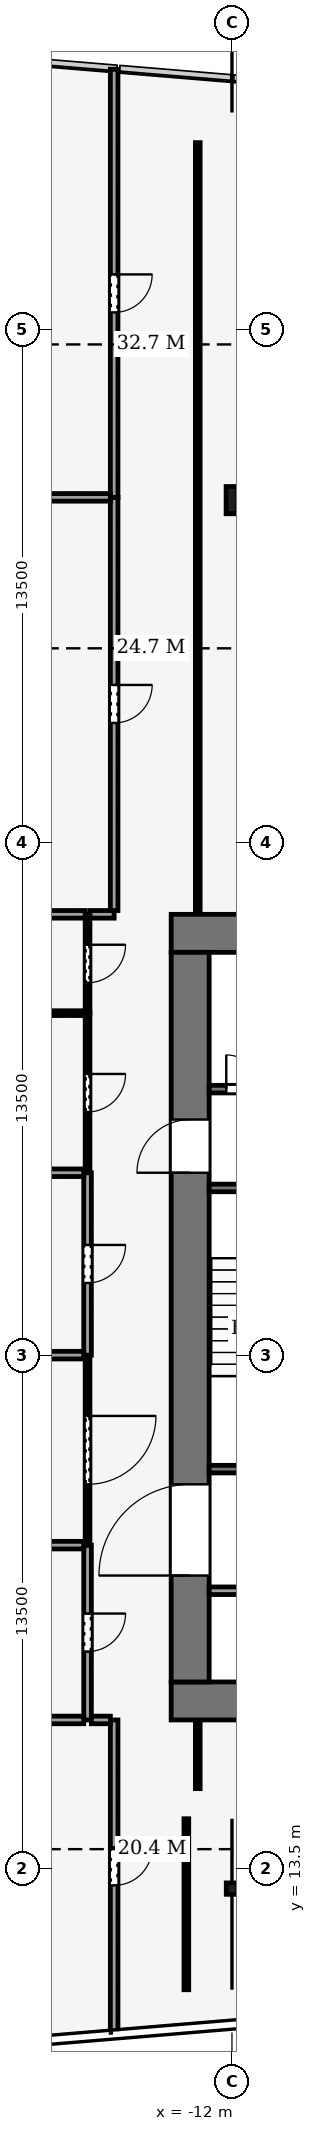
"""IFC4 building model, lengths in metres.
Left out: names, types, materials, properties, quantities, classifications, styles, units other than length and angle.
Written with IfcOpenShell. Run it as: python <this file> out.ifc"""

import sys

from ifc_helpers import new_model, si_unit, direction, frame, frame_2d, origin, origin_2d, place, context, subcontext, project, spatial, rectangle, hollow_rectangle, i_section, extrude, element, fill, save


model = new_model("IFC4")
c1 = context("Model", 3, precision=1e-05, world=origin(), true_north=direction((0.0, 1.0)))
c2 = subcontext(c1, "Body", "Model", "MODEL_VIEW")
j1 = project(units=[si_unit("LENGTHUNIT", "METRE"), si_unit("PLANEANGLEUNIT", "RADIAN")], contexts=[c1])
p1 = place(None, origin())
s1 = spatial("IfcSite", under=j1, at=p1, CompositionType="ELEMENT")
p2 = place(p1, origin())
s2 = spatial("IfcBuilding", under=s1, at=p2, CompositionType="ELEMENT")
p3 = place(p2, frame((0.0, 0.0, 170.0)))
s3 = spatial("IfcBuildingStorey", under=s2, at=p3, CompositionType="ELEMENT", Elevation=170.0)
for number, where, z_axis, x_axis in (
    (1, (-13.6, 17.9, -0.25), (0.0, 0.0, 1.0), (1.0, 0.0, 0.0)),
    (2, (-13.6, 38.1, -0.25), (0.0, 0.0, 1.0), (1.0, 0.0, 0.0)),
):
    element("IfcWall", number, at=place(p3, frame(where, z_axis=z_axis, x_axis=x_axis)), inside=s3, PredefinedType="SHEAR", context=c2, shape_type="SweptSolid", body=[
        extrude(rectangle(XDim=27.2, YDim=1.0, at=frame_2d((13.6, 0.0))), origin(), (0.0, 0.0, 1.0), 7.12),
    ])
p4 = place(p3, frame((-13.1, 18.4, -0.25), z_axis=(0.0, 0.0, 1.0), x_axis=(0.0, 1.0, 0.0)))
e3 = element("IfcWall", 3, at=p4, inside=s3, PredefinedType="SHEAR", context=c2, shape_type="SweptSolid", body=[
    extrude(rectangle(XDim=19.2, YDim=1.0, at=frame_2d((9.6, 0.0))), origin(), (0.0, 0.0, 1.0), 7.12),
])
p5 = place(p4, frame((2.8, 0.0, 0.25)))
e4 = element("IfcOpeningElement", 4, at=p5, cuts=e3, PredefinedType="OPENING", context=c2, shape_type="SweptSolid", body=[
    extrude(rectangle(XDim=2.4, YDim=2.4, at=frame_2d((1.2, 1.2))), frame((0.0, 0.51, 0.0), z_axis=(0.0, -1.0, 0.0), x_axis=(1.0, 0.0, 0.0)), (0.0, 0.0, 1.0), 1.02),
])
p6 = place(p4, frame((13.4, 0.0, 0.25)))
e5 = element("IfcOpeningElement", 5, at=p6, cuts=e3, PredefinedType="OPENING", context=c2, shape_type="SweptSolid", body=[
    extrude(rectangle(XDim=1.4, YDim=2.2, at=frame_2d((0.7, 1.1))), frame((0.0, 0.51, 0.0), z_axis=(0.0, -1.0, 0.0), x_axis=(1.0, 0.0, 0.0)), (0.0, 0.0, 1.0), 1.02),
])
p7 = place(p3, frame((-12.0, 59.7, 0.297), z_axis=(0.0, 0.780548002153, 0.625095845719), x_axis=(-1.0, 0.0, 0.0)))
e6 = element("IfcColumn", 6, at=p7, inside=s3, PredefinedType="COLUMN", context=c2, shape_type="SweptSolid", body=[
    extrude(hollow_rectangle(XDim=0.7, YDim=0.7, WallThickness=0.03, at=origin_2d()), origin(), (0.0, 0.0, 1.0), 10.249),
])
p8 = place(p3, frame((-12.0, 10.3, 0.226), z_axis=(0.0, 0.566330599135, 0.824178167925), x_axis=(-1.0, 0.0, 0.0)))
e7 = element("IfcColumn", 7, at=p8, inside=s3, PredefinedType="COLUMN", context=c2, shape_type="SweptSolid", body=[
    extrude(hollow_rectangle(XDim=0.7, YDim=0.7, WallThickness=0.03, at=origin_2d()), origin(), (0.0, 0.0, 1.0), 7.946),
])
p9 = place(p3, frame((-12.0, 49.5, 0.0), z_axis=(0.0, 0.0, 1.0), x_axis=(1.0, 0.0, 0.0)))
e8 = element("IfcColumn", 8, at=p9, inside=s3, PredefinedType="COLUMN", context=c2, shape_type="SweptSolid", body=[
    extrude(i_section(OverallWidth=0.308, OverallDepth=0.716, WebThickness=0.021, FlangeThickness=0.04, FilletRadius=0.027, at=origin_2d()), origin(), (0.0, 0.0, 1.0), 7.0),
])
p10 = place(p3, frame((-12.0, 12.961, 4.935), z_axis=(0.0, 0.0, 1.0), x_axis=(1.0, 0.0, 0.0)))
e9 = element("IfcColumn", 9, at=p10, inside=s3, PredefinedType="COLUMN", context=c2, shape_type="SweptSolid", body=[
    extrude(i_section(OverallWidth=0.3, OverallDepth=0.3, WebThickness=0.011, FlangeThickness=0.019, FilletRadius=0.027, at=origin_2d()), origin(), (0.0, 0.0, 1.0), 1.765),
])
p11 = place(p3, frame((-12.6, 20.8, 0.0), z_axis=(0.0, 0.0, 1.0), x_axis=(1.0, 0.0, 0.0)))
e10 = element("IfcWall", 10, at=p11, inside=s3, PredefinedType="PARTITIONING", context=c2, shape_type="SweptSolid", body=[
    extrude(rectangle(XDim=6.6, YDim=0.2, at=frame_2d((3.3, 0.0))), origin(), (0.0, 0.0, 1.0), 6.87),
])
p12 = place(p11, frame((2.8, 0.0, 0.0)))
e11 = element("IfcOpeningElement", 11, at=p12, cuts=e10, PredefinedType="OPENING", context=c2, shape_type="SweptSolid", body=[
    extrude(rectangle(XDim=1.0, YDim=2.1, at=frame_2d((0.5, 1.05))), frame((0.0, 0.11, 0.0), z_axis=(0.0, -1.0, 0.0), x_axis=(1.0, 0.0, 0.0)), (0.0, 0.0, 1.0), 0.22),
])
p13 = place(p3, frame((-12.6, 24.0, 0.0), z_axis=(0.0, 0.0, 1.0), x_axis=(1.0, 0.0, 0.0)))
e12 = element("IfcWall", 12, at=p13, inside=s3, PredefinedType="PARTITIONING", context=c2, shape_type="SweptSolid", body=[
    extrude(rectangle(XDim=6.6, YDim=0.2, at=frame_2d((3.3, 0.0))), origin(), (0.0, 0.0, 1.0), 6.87),
])
p14 = place(p13, frame((4.7, 0.0, 0.0)))
e13 = element("IfcOpeningElement", 13, at=p14, cuts=e12, PredefinedType="OPENING", context=c2, shape_type="SweptSolid", body=[
    extrude(rectangle(XDim=1.0, YDim=2.1, at=frame_2d((0.5, 1.05))), frame((0.0, 0.11, 0.0), z_axis=(0.0, -1.0, 0.0), x_axis=(1.0, 0.0, 0.0)), (0.0, 0.0, 1.0), 0.22),
])
p15 = place(p3, frame((-12.6, 31.4, 0.0), z_axis=(0.0, 0.0, 1.0), x_axis=(1.0, 0.0, 0.0)))
e14 = element("IfcWall", 14, at=p15, inside=s3, PredefinedType="PARTITIONING", context=c2, shape_type="SweptSolid", body=[
    extrude(rectangle(XDim=6.6, YDim=0.2, at=frame_2d((3.3, 0.0))), origin(), (0.0, 0.0, 1.0), 6.87),
])
p16 = place(p15, frame((1.0, 0.0, 0.0)))
e15 = element("IfcOpeningElement", 15, at=p16, cuts=e14, PredefinedType="OPENING", context=c2, shape_type="SweptSolid", body=[
    extrude(rectangle(XDim=1.2, YDim=2.2, at=frame_2d((0.6, 1.1))), frame((0.0, 0.11, 0.0), z_axis=(0.0, -1.0, 0.0), x_axis=(1.0, 0.0, 0.0)), (0.0, 0.0, 1.0), 0.22),
])
p17 = place(p3, frame((-12.6, 34.0, 0.0), z_axis=(0.0, 0.0, 1.0), x_axis=(1.0, 0.0, 0.0)))
e16 = element("IfcWall", 16, at=p17, inside=s3, PredefinedType="PARTITIONING", context=c2, shape_type="SweptSolid", body=[
    extrude(rectangle(XDim=6.6, YDim=0.2, at=frame_2d((3.3, 0.0))), origin(), (0.0, 0.0, 1.0), 6.87),
])
p18 = place(p17, frame((4.7, 0.0, 0.0)))
e17 = element("IfcOpeningElement", 17, at=p18, cuts=e16, PredefinedType="OPENING", context=c2, shape_type="SweptSolid", body=[
    extrude(rectangle(XDim=1.4, YDim=2.2, at=frame_2d((0.7, 1.1))), frame((0.0, 0.11, 0.0), z_axis=(0.0, -1.0, 0.0), x_axis=(1.0, 0.0, 0.0)), (0.0, 0.0, 1.0), 0.22),
])
p19 = place(p17, frame((2.3, 0.0, 0.0)))
e18 = element("IfcOpeningElement", 18, at=p19, cuts=e16, PredefinedType="OPENING", context=c2, shape_type="SweptSolid", body=[
    extrude(rectangle(XDim=1.4, YDim=2.2, at=frame_2d((0.7, 1.1))), frame((0.0, 0.11, 0.0), z_axis=(0.0, -1.0, 0.0), x_axis=(1.0, 0.0, 0.0)), (0.0, 0.0, 1.0), 0.22),
])
p20 = place(p17, frame((0.45, 0.0, 0.0)))
e19 = element("IfcOpeningElement", 19, at=p20, cuts=e16, PredefinedType="OPENING", context=c2, shape_type="SweptSolid", body=[
    extrude(rectangle(XDim=0.9, YDim=2.1, at=frame_2d((0.45, 1.05))), frame((0.0, 0.11, 0.0), z_axis=(0.0, -1.0, 0.0), x_axis=(1.0, 0.0, 0.0)), (0.0, 0.0, 1.0), 0.22),
])
p21 = place(p3, frame((-15.8, 22.0, 0.0), z_axis=(0.0, 0.0, 1.0), x_axis=(0.0, -1.0, 0.0)))
e20 = element("IfcWall", 20, at=p21, inside=s3, PredefinedType="PARTITIONING", context=c2, shape_type="SweptSolid", body=[
    extrude(rectangle(XDim=4.6, YDim=0.2, at=frame_2d((2.3, 0.0))), origin(), (0.0, 0.0, 1.0), 6.14),
])
p22 = place(p21, frame((1.8, 0.0, 0.0)))
e21 = element("IfcOpeningElement", 21, at=p22, cuts=e20, PredefinedType="OPENING", context=c2, shape_type="SweptSolid", body=[
    extrude(rectangle(XDim=1.0, YDim=2.1, at=frame_2d((0.5, 1.05))), frame((0.0, 0.11, 0.0), z_axis=(0.0, -1.0, 0.0), x_axis=(1.0, 0.0, 0.0)), (0.0, 0.0, 1.0), 0.22),
])
p23 = place(p3, frame((-15.8, 27.0, 0.0), z_axis=(0.0, 0.0, 1.0), x_axis=(0.0, -1.0, 0.0)))
e22 = element("IfcWall", 22, at=p23, inside=s3, PredefinedType="PARTITIONING", context=c2, shape_type="SweptSolid", body=[
    extrude(rectangle(XDim=5.0, YDim=0.125, at=frame_2d((2.5, 0.0))), origin(), (0.0, 0.0, 1.0), 6.39),
])
p24 = place(p23, frame((1.6, 0.0, 0.0)))
e23 = element("IfcOpeningElement", 23, at=p24, cuts=e22, PredefinedType="OPENING", context=c2, shape_type="SweptSolid", body=[
    extrude(rectangle(XDim=1.8, YDim=2.4, at=frame_2d((0.9, 1.2))), frame((0.0, 0.073, 0.0), z_axis=(0.0, -1.0, 0.0), x_axis=(1.0, 0.0, 0.0)), (0.0, 0.0, 1.0), 0.145),
])
p25 = place(p3, frame((-15.8, 31.8, 0.0), z_axis=(0.0, 0.0, 1.0), x_axis=(0.0, -1.0, 0.0)))
e24 = element("IfcWall", 24, at=p25, inside=s3, PredefinedType="PARTITIONING", context=c2, shape_type="SweptSolid", body=[
    extrude(rectangle(XDim=4.8, YDim=0.2, at=frame_2d((2.4, 0.0))), origin(), (0.0, 0.0, 1.0), 6.44),
])
p26 = place(p25, frame((1.9, 0.0, 0.0)))
e25 = element("IfcOpeningElement", 25, at=p26, cuts=e24, PredefinedType="OPENING", context=c2, shape_type="SweptSolid", body=[
    extrude(rectangle(XDim=1.0, YDim=2.1, at=frame_2d((0.5, 1.05))), frame((0.0, 0.11, 0.0), z_axis=(0.0, -1.0, 0.0), x_axis=(1.0, 0.0, 0.0)), (0.0, 0.0, 1.0), 0.22),
])
p27 = place(p3, frame((-15.8, 36.0, 0.0), z_axis=(0.0, 0.0, 1.0), x_axis=(0.0, -1.0, 0.0)))
e26 = element("IfcWall", 26, at=p27, inside=s3, PredefinedType="PARTITIONING", context=c2, shape_type="SweptSolid", body=[
    extrude(rectangle(XDim=4.2, YDim=0.125, at=frame_2d((2.1, 0.0))), origin(), (0.0, 0.0, 1.0), 6.44),
])
p28 = place(p27, frame((1.6, 0.0, 0.0)))
e27 = element("IfcOpeningElement", 27, at=p28, cuts=e26, PredefinedType="OPENING", context=c2, shape_type="SweptSolid", body=[
    extrude(rectangle(XDim=1.0, YDim=2.1, at=frame_2d((0.5, 1.05))), frame((0.0, 0.073, 0.0), z_axis=(0.0, -1.0, 0.0), x_axis=(1.0, 0.0, 0.0)), (0.0, 0.0, 1.0), 0.145),
])
p29 = place(p3, frame((-15.8, 38.6, 0.0), z_axis=(0.0, 0.0, 1.0), x_axis=(0.0, -1.0, 0.0)))
e28 = element("IfcWall", 28, at=p29, inside=s3, PredefinedType="PARTITIONING", context=c2, shape_type="SweptSolid", body=[
    extrude(rectangle(XDim=2.6, YDim=0.125, at=frame_2d((1.3, 0.0))), origin(), (0.0, 0.0, 1.0), 6.14),
])
p30 = place(p29, frame((0.8, 0.0, 0.0)))
e29 = element("IfcOpeningElement", 29, at=p30, cuts=e28, PredefinedType="OPENING", context=c2, shape_type="SweptSolid", body=[
    extrude(rectangle(XDim=1.0, YDim=2.1, at=frame_2d((0.5, 1.05))), frame((0.0, 0.073, 0.0), z_axis=(0.0, -1.0, 0.0), x_axis=(1.0, 0.0, 0.0)), (0.0, 0.0, 1.0), 0.145),
])
p31 = place(p3, frame((-15.1, 17.4, 0.0), z_axis=(0.0, 0.0, 1.0), x_axis=(0.0, -1.0, 0.0)))
e30 = element("IfcWall", 30, at=p31, inside=s3, PredefinedType="PARTITIONING", context=c2, shape_type="SweptSolid", body=[
    extrude(rectangle(XDim=8.238, YDim=0.2, at=frame_2d((4.119, 0.0))), origin(), (0.0, 0.0, 1.0), 6.04),
])
p32 = place(p31, frame((3.354, 0.0, 0.0)))
e31 = element("IfcOpeningElement", 31, at=p32, cuts=e30, PredefinedType="OPENING", context=c2, shape_type="SweptSolid", body=[
    extrude(rectangle(XDim=1.0, YDim=2.1, at=frame_2d((0.5, 1.05))), frame((0.0, 0.11, 0.0), z_axis=(0.0, -1.0, 0.0), x_axis=(1.0, 0.0, 0.0)), (0.0, 0.0, 1.0), 0.22),
])
p33 = place(p3, frame((-15.2, 17.4, 0.0), z_axis=(0.0, 0.0, 1.0), x_axis=(-1.0, 0.0, 0.0)))
e32 = element("IfcWall", 32, at=p33, inside=s3, PredefinedType="PARTITIONING", context=c2, shape_type="SweptSolid", body=[
    extrude(rectangle(XDim=0.5, YDim=0.2, at=frame_2d((0.25, 0.0))), origin(), (0.0, 0.0, 1.0), 6.14),
])
p34 = place(p3, frame((-15.738, 38.6, 0.0), z_axis=(0.0, 0.0, 1.0), x_axis=(1.0, 0.0, 0.0)))
e33 = element("IfcWall", 33, at=p34, inside=s3, PredefinedType="PARTITIONING", context=c2, shape_type="SweptSolid", body=[
    extrude(rectangle(XDim=0.637, YDim=0.2, at=frame_2d((0.319, 0.0))), origin(), (0.0, 0.0, 1.0), 6.14),
])
p35 = place(p3, frame((-15.1, 49.573, 0.0), z_axis=(0.0, 0.0, 1.0), x_axis=(0.0, -1.0, 0.0)))
e34 = element("IfcWall", 34, at=p35, inside=s3, PredefinedType="PARTITIONING", context=c2, shape_type="SweptSolid", body=[
    extrude(rectangle(XDim=10.873, YDim=0.2, at=frame_2d((5.437, 0.0))), origin(), (0.0, 0.0, 1.0), 6.14),
])
p36 = place(p35, frame((4.937, 0.0, 0.0)))
e35 = element("IfcOpeningElement", 35, at=p36, cuts=e34, PredefinedType="OPENING", context=c2, shape_type="SweptSolid", body=[
    extrude(rectangle(XDim=1.0, YDim=2.1, at=frame_2d((0.5, 1.05))), frame((0.0, 0.11, 0.0), z_axis=(0.0, -1.0, 0.0), x_axis=(1.0, 0.0, 0.0)), (0.0, 0.0, 1.0), 0.22),
])
p37 = place(p3, frame((-15.1, 60.838, 0.0), z_axis=(0.0, 0.0, 1.0), x_axis=(0.0, -1.0, 0.0)))
e36 = element("IfcWall", 36, at=p37, inside=s3, PredefinedType="PARTITIONING", context=c2, shape_type="SweptSolid", body=[
    extrude(rectangle(XDim=11.265, YDim=0.2, at=frame_2d((5.633, 0.0))), origin(), (0.0, 0.0, 1.0), 6.24),
])
p38 = place(p37, frame((5.398, 0.0, 0.0)))
e37 = element("IfcOpeningElement", 37, at=p38, cuts=e36, PredefinedType="OPENING", context=c2, shape_type="SweptSolid", body=[
    extrude(rectangle(XDim=1.0, YDim=2.1, at=frame_2d((0.5, 1.05))), frame((0.0, 0.11, 0.0), z_axis=(0.0, -1.0, 0.0), x_axis=(1.0, 0.0, 0.0)), (0.0, 0.0, 1.0), 0.22),
])
p39 = place(p3, frame((-19.9, 22.0, 0.0), z_axis=(0.0, 0.0, 1.0), x_axis=(1.0, 0.0, 0.0)))
e38 = element("IfcWall", 38, at=p39, inside=s3, PredefinedType="PARTITIONING", context=c2, shape_type="SweptSolid", body=[
    extrude(rectangle(XDim=4.0, YDim=0.2, at=frame_2d((2.0, 0.0))), origin(), (0.0, 0.0, 1.0), 6.87),
])
p40 = place(p3, frame((-15.9, 17.4, 0.0), z_axis=(0.0, 0.0, 1.0), x_axis=(-1.0, 0.0, 0.0)))
e39 = element("IfcWall", 39, at=p40, inside=s3, PredefinedType="PARTITIONING", context=c2, shape_type="SweptSolid", body=[
    extrude(rectangle(XDim=4.0, YDim=0.2, at=frame_2d((2.0, 0.0))), origin(), (0.0, 0.0, 1.0), 6.14),
])
for number, where, z_axis, x_axis in (
    (40, (-19.9, 27.0, 0.0), (0.0, 0.0, 1.0), (1.0, 0.0, 0.0)),
    (41, (-19.9, 31.8, 0.0), (0.0, 0.0, 1.0), (1.0, 0.0, 0.0)),
):
    element("IfcWall", number, at=place(p3, frame(where, z_axis=z_axis, x_axis=x_axis)), inside=s3, PredefinedType="PARTITIONING", context=c2, shape_type="SweptSolid", body=[
        extrude(rectangle(XDim=4.0, YDim=0.2, at=frame_2d((2.0, 0.0))), origin(), (0.0, 0.0, 1.0), 6.87),
    ])
p41 = place(p3, frame((-19.8, 36.0, 0.0), z_axis=(0.0, 0.0, 1.0), x_axis=(1.0, 0.0, 0.0)))
e42 = element("IfcWall", 42, at=p41, inside=s3, PredefinedType="PARTITIONING", context=c2, shape_type="SweptSolid", body=[
    extrude(rectangle(XDim=3.938, YDim=0.125, at=frame_2d((1.969, 0.0))), origin(), (0.0, 0.0, 1.0), 6.87),
])
p42 = place(p3, frame((-19.8, 38.6, 0.0), z_axis=(0.0, 0.0, 1.0), x_axis=(1.0, 0.0, 0.0)))
e43 = element("IfcWall", 43, at=p42, inside=s3, PredefinedType="PARTITIONING", context=c2, shape_type="SweptSolid", body=[
    extrude(rectangle(XDim=3.938, YDim=0.2, at=frame_2d((1.969, 0.0))), origin(), (0.0, 0.0, 1.0), 6.14),
])
p43 = place(p3, frame((-19.9, 49.573, 0.0), z_axis=(0.0, 0.0, 1.0), x_axis=(1.0, 0.0, 0.0)))
e44 = element("IfcWall", 44, at=p43, inside=s3, PredefinedType="PARTITIONING", context=c2, shape_type="SweptSolid", body=[
    extrude(rectangle(XDim=4.7, YDim=0.2, at=frame_2d((2.35, 0.0))), origin(), (0.0, 0.0, 1.0), 6.24),
])
p44 = place(p3, frame((-12.9, 58.908, 0.0), z_axis=(0.0, 0.0, 1.0), x_axis=(0.0, -1.0, 0.0)))
e45 = element("IfcWall", 45, at=p44, inside=s3, PredefinedType="PARTITIONING", context=c2, shape_type="SweptSolid", body=[
    extrude(rectangle(XDim=20.258, YDim=0.125, at=frame_2d((10.129, 0.0))), origin(), (0.0, 0.0, 1.0), 6.24),
])
p45 = place(p3, frame((-12.9, 17.35, 0.0), z_axis=(0.0, 0.0, 1.0), x_axis=(0.0, -1.0, 0.0)))
e46 = element("IfcWall", 46, at=p45, inside=s3, PredefinedType="PARTITIONING", context=c2, shape_type="SweptSolid", body=[
    extrude(rectangle(XDim=1.758, YDim=0.125, at=frame_2d((0.879, 0.0))), origin(), (0.0, 0.0, 1.0), 6.87),
])
p46 = place(p3, frame((-13.2, 14.8, 0.0), z_axis=(0.0, 0.0, 1.0), x_axis=(0.0, -1.0, 0.0)))
e47 = element("IfcWall", 47, at=p46, inside=s3, PredefinedType="PARTITIONING", context=c2, shape_type="SweptSolid", body=[
    extrude(rectangle(XDim=4.5, YDim=0.125, at=frame_2d((2.25, 0.0))), origin(), (0.0, 0.0, 1.0), 6.04),
])
p47 = place(p20, origin())
e48 = element("IfcDoor", 48, at=p47, inside=s3, OperationType="SINGLE_SWING_RIGHT", PredefinedType="DOOR", context=c2, shape_type="SweptSolid", body=[
    extrude(rectangle(XDim=0.9, YDim=2.1, at=frame_2d((0.45, 1.05))), frame((0.0, 0.025, 0.0), z_axis=(0.0, -1.0, 0.0), x_axis=(1.0, 0.0, 0.0)), (0.0, 0.0, 1.0), 0.05),
])
fill(e19, e48)
p48 = place(p5, origin())
e49 = element("IfcDoor", 49, at=p48, inside=s3, OperationType="DOUBLE_DOOR_SINGLE_SWING", PredefinedType="DOOR", context=c2, shape_type="SweptSolid", body=[
    extrude(rectangle(XDim=2.4, YDim=2.4, at=frame_2d((1.2, 1.2))), frame((0.0, 0.025, 0.0), z_axis=(0.0, -1.0, 0.0), x_axis=(1.0, 0.0, 0.0)), (0.0, 0.0, 1.0), 0.05),
])
fill(e4, e49)
p49 = place(p6, origin())
e50 = element("IfcDoor", 50, at=p49, inside=s3, OperationType="SINGLE_SWING_RIGHT", PredefinedType="DOOR", context=c2, shape_type="SweptSolid", body=[
    extrude(rectangle(XDim=1.4, YDim=2.2, at=frame_2d((0.7, 1.1))), frame((0.0, 0.025, 0.0), z_axis=(0.0, -1.0, 0.0), x_axis=(1.0, 0.0, 0.0)), (0.0, 0.0, 1.0), 0.05),
])
fill(e5, e50)
p50 = place(p22, origin())
e51 = element("IfcDoor", 51, at=p50, inside=s3, OperationType="SINGLE_SWING_LEFT", PredefinedType="DOOR", context=c2, shape_type="SweptSolid", body=[
    extrude(rectangle(XDim=1.0, YDim=2.1, at=frame_2d((0.5, 1.05))), frame((0.0, 0.025, 0.0), z_axis=(0.0, -1.0, 0.0), x_axis=(1.0, 0.0, 0.0)), (0.0, 0.0, 1.0), 0.05),
])
fill(e21, e51)
p51 = place(p24, origin())
e52 = element("IfcDoor", 52, at=p51, inside=s3, OperationType="DOUBLE_DOOR_SINGLE_SWING", PredefinedType="DOOR", context=c2, shape_type="SweptSolid", body=[
    extrude(rectangle(XDim=1.8, YDim=2.4, at=frame_2d((0.9, 1.2))), frame((0.0, 0.025, 0.0), z_axis=(0.0, -1.0, 0.0), x_axis=(1.0, 0.0, 0.0)), (0.0, 0.0, 1.0), 0.05),
])
fill(e23, e52)
p52 = place(p26, origin())
e53 = element("IfcDoor", 53, at=p52, inside=s3, OperationType="SINGLE_SWING_LEFT", PredefinedType="DOOR", context=c2, shape_type="SweptSolid", body=[
    extrude(rectangle(XDim=1.0, YDim=2.1, at=frame_2d((0.5, 1.05))), frame((0.0, 0.025, 0.0), z_axis=(0.0, -1.0, 0.0), x_axis=(1.0, 0.0, 0.0)), (0.0, 0.0, 1.0), 0.05),
])
fill(e25, e53)
p53 = place(p28, origin())
e54 = element("IfcDoor", 54, at=p53, inside=s3, OperationType="SINGLE_SWING_RIGHT", PredefinedType="DOOR", context=c2, shape_type="SweptSolid", body=[
    extrude(rectangle(XDim=1.0, YDim=2.1, at=frame_2d((0.5, 1.05))), frame((0.0, 0.025, 0.0), z_axis=(0.0, -1.0, 0.0), x_axis=(1.0, 0.0, 0.0)), (0.0, 0.0, 1.0), 0.05),
])
fill(e27, e54)
p54 = place(p30, origin())
e55 = element("IfcDoor", 55, at=p54, inside=s3, OperationType="SINGLE_SWING_LEFT", PredefinedType="DOOR", context=c2, shape_type="SweptSolid", body=[
    extrude(rectangle(XDim=1.0, YDim=2.1, at=frame_2d((0.5, 1.05))), frame((0.0, 0.025, 0.0), z_axis=(0.0, -1.0, 0.0), x_axis=(1.0, 0.0, 0.0)), (0.0, 0.0, 1.0), 0.05),
])
fill(e29, e55)
p55 = place(p32, origin())
e56 = element("IfcDoor", 56, at=p55, inside=s3, OperationType="SINGLE_SWING_LEFT", PredefinedType="DOOR", context=c2, shape_type="SweptSolid", body=[
    extrude(rectangle(XDim=1.0, YDim=2.1, at=frame_2d((0.5, 1.05))), frame((0.0, 0.025, 0.0), z_axis=(0.0, -1.0, 0.0), x_axis=(1.0, 0.0, 0.0)), (0.0, 0.0, 1.0), 0.05),
])
fill(e31, e56)
p56 = place(p36, origin())
e57 = element("IfcDoor", 57, at=p56, inside=s3, OperationType="SINGLE_SWING_LEFT", PredefinedType="DOOR", context=c2, shape_type="SweptSolid", body=[
    extrude(rectangle(XDim=1.0, YDim=2.1, at=frame_2d((0.5, 1.05))), frame((0.0, 0.025, 0.0), z_axis=(0.0, -1.0, 0.0), x_axis=(1.0, 0.0, 0.0)), (0.0, 0.0, 1.0), 0.05),
])
fill(e35, e57)
p57 = place(p38, origin())
e58 = element("IfcDoor", 58, at=p57, inside=s3, OperationType="SINGLE_SWING_RIGHT", PredefinedType="DOOR", context=c2, shape_type="SweptSolid", body=[
    extrude(rectangle(XDim=1.0, YDim=2.1, at=frame_2d((0.5, 1.05))), frame((0.0, 0.025, 0.0), z_axis=(0.0, -1.0, 0.0), x_axis=(1.0, 0.0, 0.0)), (0.0, 0.0, 1.0), 0.05),
])
fill(e37, e58)
save(model, sys.argv[1])
